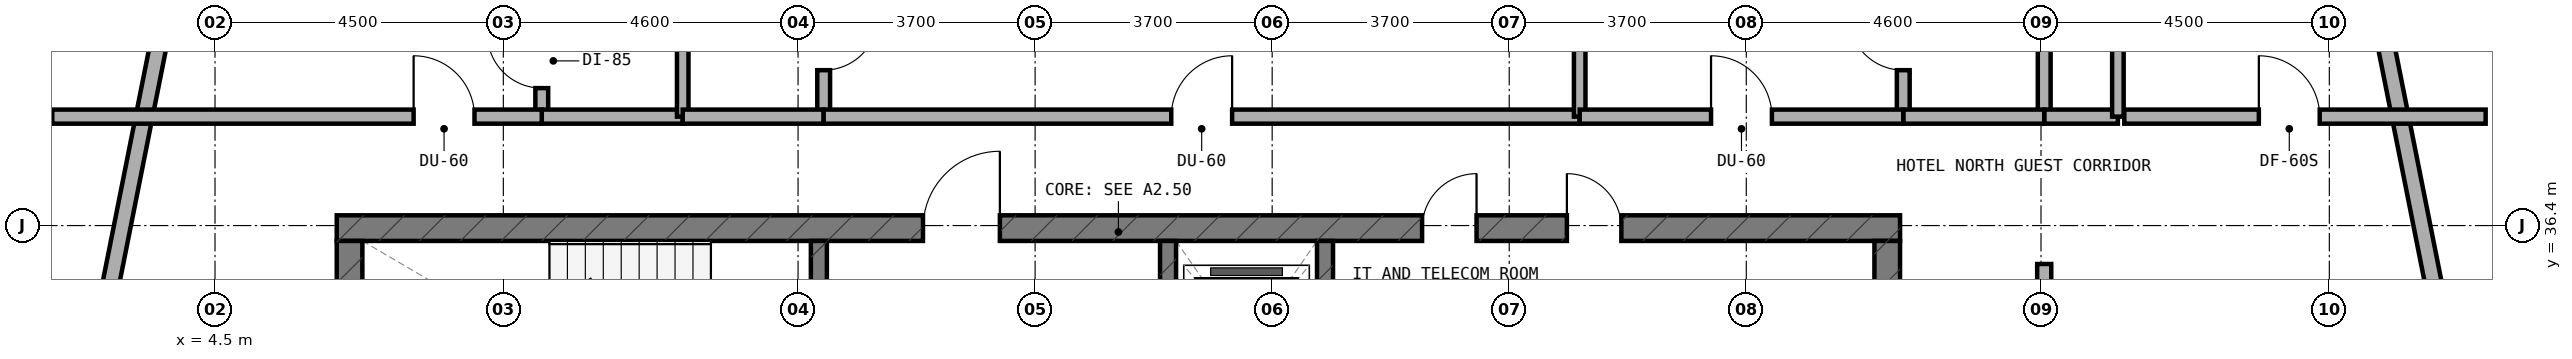
"""IFC4 building model, lengths in metres.
Left out: names, types, materials, properties, quantities, classifications, styles, units other than length and angle.
Written with IfcOpenShell. Run it as: python <this file> out.ifc"""

import sys

from ifc_helpers import new_model, si_unit, direction, frame, frame_2d, origin, place, context, subcontext, project, spatial, rectangle, extrude, element, fill, save


model = new_model("IFC4")
c1 = context("Model", 3, precision=1e-05, world=origin(), true_north=direction((0.0, 1.0)))
c2 = subcontext(c1, "Body", "Model", "MODEL_VIEW")
j1 = project(units=[si_unit("LENGTHUNIT", "METRE"), si_unit("PLANEANGLEUNIT", "RADIAN")], contexts=[c1])
p1 = place(None, origin())
s1 = spatial("IfcSite", under=j1, at=p1, CompositionType="ELEMENT")
p2 = place(p1, origin())
s2 = spatial("IfcBuilding", under=s1, at=p2, CompositionType="ELEMENT")
p3 = place(p2, frame((0.0, 0.0, 235.1)))
s3 = spatial("IfcBuildingStorey", under=s2, at=p3, CompositionType="ELEMENT", Elevation=235.1)
p4 = place(p3, frame((6.4, 36.36, 0.0), z_axis=(0.0, 0.0, 1.0), x_axis=(1.0, 0.0, 0.0)))
e1 = element("IfcWall", 1, at=p4, inside=s3, PredefinedType="SHEAR", context=c2, shape_type="SweptSolid", body=[
    extrude(rectangle(XDim=24.4, YDim=0.4, at=frame_2d((12.2, 0.0))), origin(), (0.0, 0.0, 1.0), 3.6),
])
p5 = place(p4, frame((9.15, 0.0, 0.0)))
e2 = element("IfcOpeningElement", 2, at=p5, cuts=e1, PredefinedType="OPENING", context=c2, shape_type="SweptSolid", body=[
    extrude(rectangle(XDim=1.2, YDim=2.15, at=frame_2d((0.6, 1.075))), frame((0.0, 0.21, 0.0), z_axis=(0.0, -1.0, 0.0), x_axis=(1.0, 0.0, 0.0)), (0.0, 0.0, 1.0), 0.42),
])
p6 = place(p4, frame((19.2, 0.0, 0.0)))
e3 = element("IfcOpeningElement", 3, at=p6, cuts=e1, PredefinedType="OPENING", context=c2, shape_type="SweptSolid", body=[
    extrude(rectangle(XDim=0.85, YDim=2.1, at=frame_2d((0.425, 1.05))), frame((0.0, 0.21, 0.0), z_axis=(0.0, -1.0, 0.0), x_axis=(1.0, 0.0, 0.0)), (0.0, 0.0, 1.0), 0.42),
])
p7 = place(p4, frame((16.94, 0.0, 0.0)))
e4 = element("IfcOpeningElement", 4, at=p7, cuts=e1, PredefinedType="OPENING", context=c2, shape_type="SweptSolid", body=[
    extrude(rectangle(XDim=0.85, YDim=2.1, at=frame_2d((0.425, 1.05))), frame((0.0, 0.21, 0.0), z_axis=(0.0, -1.0, 0.0), x_axis=(1.0, 0.0, 0.0)), (0.0, 0.0, 1.0), 0.42),
])
for number, where, z_axis, x_axis in (
    (5, (6.6, 33.0, 0.0), (0.0, 0.0, 1.0), (0.0, 1.0, 0.0)),
    (6, (30.6, 33.0, 0.0), (0.0, 0.0, 1.0), (0.0, 1.0, 0.0)),
):
    element("IfcWall", number, at=place(p3, frame(where, z_axis=z_axis, x_axis=x_axis)), inside=s3, PredefinedType="SHEAR", context=c2, shape_type="SweptSolid", body=[
        extrude(rectangle(XDim=3.16, YDim=0.4, at=frame_2d((1.58, 0.0))), origin(), (0.0, 0.0, 1.0), 3.6),
    ])
p8 = place(p3, frame((13.925, 33.0, 0.0), z_axis=(0.0, 0.0, 1.0), x_axis=(0.0, 1.0, 0.0)))
e7 = element("IfcWall", 7, at=p8, inside=s3, PredefinedType="STANDARD", context=c2, shape_type="SweptSolid", body=[
    extrude(rectangle(XDim=3.16, YDim=0.25, at=frame_2d((1.58, 0.0))), origin(), (0.0, 0.0, 1.0), 3.28),
])
p9 = place(p8, frame((0.98, 0.0, 0.0)))
e8 = element("IfcOpeningElement", 8, at=p9, cuts=e7, PredefinedType="OPENING", context=c2, shape_type="SweptSolid", body=[
    extrude(rectangle(XDim=1.1, YDim=2.15, at=frame_2d((0.55, 1.075))), frame((0.0, 0.135, 0.0), z_axis=(0.0, -1.0, 0.0), x_axis=(1.0, 0.0, 0.0)), (0.0, 0.0, 1.0), 0.27),
])
p10 = place(p3, frame((19.375, 33.0, 0.0), z_axis=(0.0, 0.0, 1.0), x_axis=(0.0, 1.0, 0.0)))
e9 = element("IfcWall", 9, at=p10, inside=s3, PredefinedType="STANDARD", context=c2, shape_type="SweptSolid", body=[
    extrude(rectangle(XDim=3.16, YDim=0.25, at=frame_2d((1.58, 0.0))), origin(), (0.0, 0.0, 1.0), 3.28),
])
p11 = place(p10, frame((0.98, 0.0, 0.0)))
e10 = element("IfcOpeningElement", 10, at=p11, cuts=e9, PredefinedType="OPENING", context=c2, shape_type="SweptSolid", body=[
    extrude(rectangle(XDim=1.1, YDim=2.15, at=frame_2d((0.55, 1.075))), frame((0.0, 0.135, 0.0), z_axis=(0.0, -1.0, 0.0), x_axis=(1.0, 0.0, 0.0)), (0.0, 0.0, 1.0), 0.27),
])
p12 = place(p3, frame((21.825, 33.0, 0.0), z_axis=(0.0, 0.0, 1.0), x_axis=(0.0, 1.0, 0.0)))
e11 = element("IfcWall", 11, at=p12, inside=s3, PredefinedType="STANDARD", context=c2, shape_type="SweptSolid", body=[
    extrude(rectangle(XDim=3.16, YDim=0.25, at=frame_2d((1.58, 0.0))), origin(), (0.0, 0.0, 1.0), 3.28),
])
p13 = place(p3, frame((40.084, 30.681, 0.0), z_axis=(0.0, 0.0, 1.0), x_axis=(-0.195291715883, 0.980745199176, 0.0)))
e12 = element("IfcWall", 12, at=p13, inside=s3, PredefinedType="STANDARD", context=c2, shape_type="SweptSolid", body=[
    extrude(rectangle(XDim=8.771, YDim=0.26, at=frame_2d((4.385, 0.0))), origin(), (0.0, 0.0, 1.0), 3.28),
])
p14 = place(p13, frame((2.67, 0.0, 0.85)))
e13 = element("IfcOpeningElement", 13, at=p14, cuts=e12, PredefinedType="OPENING", context=c2, shape_type="SweptSolid", body=[
    extrude(rectangle(XDim=2.1, YDim=1.5, at=frame_2d((1.05, 0.75))), frame((0.0, 0.14, 0.0), z_axis=(0.0, -1.0, 0.0), x_axis=(1.0, 0.0, 0.0)), (0.0, 0.0, 1.0), 0.28),
])
p15 = place(p3, frame((3.629, 39.283, 0.0), z_axis=(0.0, 0.0, 1.0), x_axis=(-0.195291715883, -0.980745199176, 0.0)))
e14 = element("IfcWall", 14, at=p15, inside=s3, PredefinedType="STANDARD", context=c2, shape_type="SweptSolid", body=[
    extrude(rectangle(XDim=8.771, YDim=0.26, at=frame_2d((4.385, 0.0))), origin(), (0.0, 0.0, 1.0), 3.28),
])
p16 = place(p15, frame((4.0, 0.0, 0.85)))
e15 = element("IfcOpeningElement", 15, at=p16, cuts=e14, PredefinedType="OPENING", context=c2, shape_type="SweptSolid", body=[
    extrude(rectangle(XDim=2.1, YDim=1.5, at=frame_2d((1.05, 0.75))), frame((0.0, 0.14, 0.0), z_axis=(0.0, -1.0, 0.0), x_axis=(1.0, 0.0, 0.0)), (0.0, 0.0, 1.0), 0.28),
])
p17 = place(p3, frame((9.6, 38.2, 0.0), z_axis=(0.0, 0.0, 1.0), x_axis=(0.0, 1.0, 0.0)))
e16 = element("IfcWall", 16, at=p17, inside=s3, PredefinedType="PLUMBINGWALL", context=c2, shape_type="SweptSolid", body=[
    extrude(rectangle(XDim=2.1, YDim=0.2, at=frame_2d((1.05, 0.0))), origin(), (0.0, 0.0, 1.0), 2.895),
])
p18 = place(p17, frame((0.345, 0.0, 0.0)))
e17 = element("IfcOpeningElement", 17, at=p18, cuts=e16, PredefinedType="OPENING", context=c2, shape_type="SweptSolid", body=[
    extrude(rectangle(XDim=0.85, YDim=2.1, at=frame_2d((0.425, 1.05))), frame((0.0, 0.11, 0.0), z_axis=(0.0, -1.0, 0.0), x_axis=(1.0, 0.0, 0.0)), (0.0, 0.0, 1.0), 0.22),
])
p19 = place(p3, frame((9.6, 38.1, 0.0), z_axis=(0.0, 0.0, 1.0), x_axis=(1.0, 0.0, 0.0)))
e18 = element("IfcWall", 18, at=p19, inside=s3, PredefinedType="SOLIDWALL", context=c2, shape_type="SweptSolid", body=[
    extrude(rectangle(XDim=2.2, YDim=0.22, at=frame_2d((1.1, 0.0))), origin(), (0.0, 0.0, 1.0), 3.28),
])
p20 = place(p3, frame((1.96, 38.1, 0.0), z_axis=(0.0, 0.0, 1.0), x_axis=(1.0, 0.0, 0.0)))
e19 = element("IfcWall", 19, at=p20, inside=s3, PredefinedType="SOLIDWALL", context=c2, shape_type="SweptSolid", body=[
    extrude(rectangle(XDim=7.64, YDim=0.22, at=frame_2d((3.82, 0.0))), origin(), (0.0, 0.0, 1.0), 2.705),
])
p21 = place(p20, frame((5.64, 0.0, 0.0)))
e20 = element("IfcOpeningElement", 20, at=p21, cuts=e19, PredefinedType="OPENING", context=c2, shape_type="SweptSolid", body=[
    extrude(rectangle(XDim=0.95, YDim=2.1, at=frame_2d((0.475, 1.05))), frame((0.0, 0.12, 0.0), z_axis=(0.0, -1.0, 0.0), x_axis=(1.0, 0.0, 0.0)), (0.0, 0.0, 1.0), 0.24),
])
p22 = place(p3, frame((11.8, 38.1, 0.0), z_axis=(0.0, 0.0, 1.0), x_axis=(0.0, 1.0, 0.0)))
e21 = element("IfcWall", 21, at=p22, inside=s3, PredefinedType="SOLIDWALL", context=c2, shape_type="SweptSolid", body=[
    extrude(rectangle(XDim=5.354, YDim=0.18, at=frame_2d((2.677, 0.0))), origin(), (0.0, 0.0, 1.0), 2.895),
])
p23 = place(p3, frame((14.0, 38.2, 0.0), z_axis=(0.0, 0.0, 1.0), x_axis=(0.0, 1.0, 0.0)))
e22 = element("IfcWall", 22, at=p23, inside=s3, PredefinedType="PLUMBINGWALL", context=c2, shape_type="SweptSolid", body=[
    extrude(rectangle(XDim=2.1, YDim=0.2, at=frame_2d((1.05, 0.0))), origin(), (0.0, 0.0, 1.0), 2.895),
])
p24 = place(p23, frame((0.625, 0.0, 0.0)))
e23 = element("IfcOpeningElement", 23, at=p24, cuts=e22, PredefinedType="OPENING", context=c2, shape_type="SweptSolid", body=[
    extrude(rectangle(XDim=0.85, YDim=2.1, at=frame_2d((0.425, 1.05))), frame((0.0, 0.11, 0.0), z_axis=(0.0, -1.0, 0.0), x_axis=(1.0, 0.0, 0.0)), (0.0, 0.0, 1.0), 0.22),
])
p25 = place(p3, frame((11.8, 38.1, 0.0), z_axis=(0.0, 0.0, 1.0), x_axis=(1.0, 0.0, 0.0)))
e24 = element("IfcWall", 24, at=p25, inside=s3, PredefinedType="SOLIDWALL", context=c2, shape_type="SweptSolid", body=[
    extrude(rectangle(XDim=2.2, YDim=0.22, at=frame_2d((1.1, 0.0))), origin(), (0.0, 0.0, 1.0), 3.28),
])
p26 = place(p3, frame((14.0, 38.1, 0.0), z_axis=(0.0, 0.0, 1.0), x_axis=(1.0, 0.0, 0.0)))
e25 = element("IfcWall", 25, at=p26, inside=s3, PredefinedType="SOLIDWALL", context=c2, shape_type="SweptSolid", body=[
    extrude(rectangle(XDim=11.8, YDim=0.22, at=frame_2d((5.9, 0.0))), origin(), (0.0, 0.0, 1.0), 2.705),
])
p27 = place(p26, frame((5.425, 0.0, 0.0)))
e26 = element("IfcOpeningElement", 26, at=p27, cuts=e25, PredefinedType="OPENING", context=c2, shape_type="SweptSolid", body=[
    extrude(rectangle(XDim=0.95, YDim=2.1, at=frame_2d((0.475, 1.05))), frame((0.0, 0.12, 0.0), z_axis=(0.0, -1.0, 0.0), x_axis=(1.0, 0.0, 0.0)), (0.0, 0.0, 1.0), 0.24),
])
p28 = place(p3, frame((25.8, 38.1, 0.0), z_axis=(0.0, 0.0, 1.0), x_axis=(0.0, 1.0, 0.0)))
e27 = element("IfcWall", 27, at=p28, inside=s3, PredefinedType="SOLIDWALL", context=c2, shape_type="SweptSolid", body=[
    extrude(rectangle(XDim=6.04, YDim=0.18, at=frame_2d((3.02, 0.0))), origin(), (0.0, 0.0, 1.0), 2.705),
])
p29 = place(p3, frame((30.85, 38.2, 0.0), z_axis=(0.0, 0.0, 1.0), x_axis=(0.0, 1.0, 0.0)))
e28 = element("IfcWall", 28, at=p29, inside=s3, PredefinedType="PLUMBINGWALL", context=c2, shape_type="SweptSolid", body=[
    extrude(rectangle(XDim=2.1, YDim=0.2, at=frame_2d((1.05, 0.0))), origin(), (0.0, 0.0, 1.0), 2.895),
])
p30 = place(p29, frame((0.625, 0.0, 0.0)))
e29 = element("IfcOpeningElement", 29, at=p30, cuts=e28, PredefinedType="OPENING", context=c2, shape_type="SweptSolid", body=[
    extrude(rectangle(XDim=0.85, YDim=2.1, at=frame_2d((0.425, 1.05))), frame((0.0, 0.11, 0.0), z_axis=(0.0, -1.0, 0.0), x_axis=(1.0, 0.0, 0.0)), (0.0, 0.0, 1.0), 0.22),
])
p31 = place(p3, frame((33.05, 38.2, 0.0), z_axis=(0.0, 0.0, 1.0), x_axis=(0.0, 1.0, 0.0)))
e30 = element("IfcWall", 30, at=p31, inside=s3, PredefinedType="PLUMBINGWALL", context=c2, shape_type="SweptSolid", body=[
    extrude(rectangle(XDim=2.1, YDim=0.2, at=frame_2d((1.05, 0.0))), origin(), (0.0, 0.0, 1.0), 2.895),
])
p32 = place(p3, frame((33.05, 38.1, 0.0), z_axis=(0.0, 0.0, 1.0), x_axis=(1.0, 0.0, 0.0)))
e31 = element("IfcWall", 31, at=p32, inside=s3, PredefinedType="SOLIDWALL", context=c2, shape_type="SweptSolid", body=[
    extrude(rectangle(XDim=1.15, YDim=0.22, at=frame_2d((0.575, 0.0))), origin(), (0.0, 0.0, 1.0), 2.705),
])
p33 = place(p3, frame((30.85, 38.1, 0.0), z_axis=(0.0, 0.0, 1.0), x_axis=(1.0, 0.0, 0.0)))
e32 = element("IfcWall", 32, at=p33, inside=s3, PredefinedType="SOLIDWALL", context=c2, shape_type="SweptSolid", body=[
    extrude(rectangle(XDim=2.2, YDim=0.22, at=frame_2d((1.1, 0.0))), origin(), (0.0, 0.0, 1.0), 3.28),
])
p34 = place(p3, frame((25.8, 38.1, 0.0), z_axis=(0.0, 0.0, 1.0), x_axis=(1.0, 0.0, 0.0)))
e33 = element("IfcWall", 33, at=p34, inside=s3, PredefinedType="SOLIDWALL", context=c2, shape_type="SweptSolid", body=[
    extrude(rectangle(XDim=5.05, YDim=0.22, at=frame_2d((2.525, 0.0))), origin(), (0.0, 0.0, 1.0), 2.705),
])
p35 = place(p34, frame((2.05, 0.0, 0.0)))
e34 = element("IfcOpeningElement", 34, at=p35, cuts=e33, PredefinedType="OPENING", context=c2, shape_type="SweptSolid", body=[
    extrude(rectangle(XDim=0.95, YDim=2.1, at=frame_2d((0.475, 1.05))), frame((0.0, 0.12, 0.0), z_axis=(0.0, -1.0, 0.0), x_axis=(1.0, 0.0, 0.0)), (0.0, 0.0, 1.0), 0.24),
])
p36 = place(p3, frame((34.2, 38.1, 0.0), z_axis=(0.0, 0.0, 1.0), x_axis=(0.0, 1.0, 0.0)))
e35 = element("IfcWall", 35, at=p36, inside=s3, PredefinedType="SOLIDWALL", context=c2, shape_type="SweptSolid", body=[
    extrude(rectangle(XDim=4.558, YDim=0.18, at=frame_2d((2.279, 0.0))), origin(), (0.0, 0.0, 1.0), 2.705),
])
p37 = place(p3, frame((34.3, 38.1, 0.0), z_axis=(0.0, 0.0, 1.0), x_axis=(1.0, 0.0, 0.0)))
e36 = element("IfcWall", 36, at=p37, inside=s3, PredefinedType="SOLIDWALL", context=c2, shape_type="SweptSolid", body=[
    extrude(rectangle(XDim=5.64, YDim=0.22, at=frame_2d((2.82, 0.0))), origin(), (0.0, 0.0, 1.0), 2.975),
])
p38 = place(p37, frame((2.1, 0.0, 0.0)))
e37 = element("IfcOpeningElement", 37, at=p38, cuts=e36, PredefinedType="OPENING", context=c2, shape_type="SweptSolid", body=[
    extrude(rectangle(XDim=0.95, YDim=2.1, at=frame_2d((0.475, 1.05))), frame((0.0, 0.12, 0.0), z_axis=(0.0, -1.0, 0.0), x_axis=(1.0, 0.0, 0.0)), (0.0, 0.0, 1.0), 0.24),
])
p39 = place(p3, frame((33.05, 27.2, 0.0), z_axis=(0.0, 0.0, 1.0), x_axis=(0.0, 1.0, 0.0)))
e38 = element("IfcWall", 38, at=p39, inside=s3, PredefinedType="SOLIDWALL", context=c2, shape_type="SweptSolid", body=[
    extrude(rectangle(XDim=8.6, YDim=0.22, at=frame_2d((4.3, 0.0))), origin(), (0.0, 0.0, 1.0), 2.705),
])
p40 = place(p39, frame((3.825, 0.0, 0.0)))
e39 = element("IfcOpeningElement", 39, at=p40, cuts=e38, PredefinedType="OPENING", context=c2, shape_type="SweptSolid", body=[
    extrude(rectangle(XDim=0.95, YDim=2.1, at=frame_2d((0.475, 1.05))), frame((0.0, 0.12, 0.0), z_axis=(0.0, -1.0, 0.0), x_axis=(1.0, 0.0, 0.0)), (0.0, 0.0, 1.0), 0.24),
])
p41 = place(p5, origin())
e40 = element("IfcDoor", 40, at=p41, inside=s3, OperationType="SINGLE_SWING_RIGHT", PredefinedType="DOOR", context=c2, shape_type="SweptSolid", body=[
    extrude(rectangle(XDim=1.2, YDim=2.15, at=frame_2d((0.6, 1.075))), frame((0.0, 0.025, 0.0), z_axis=(0.0, -1.0, 0.0), x_axis=(1.0, 0.0, 0.0)), (0.0, 0.0, 1.0), 0.05),
])
fill(e2, e40)
p42 = place(p6, origin())
e41 = element("IfcDoor", 41, at=p42, inside=s3, OperationType="SINGLE_SWING_LEFT", PredefinedType="DOOR", context=c2, shape_type="SweptSolid", body=[
    extrude(rectangle(XDim=0.85, YDim=2.1, at=frame_2d((0.425, 1.05))), frame((0.0, 0.025, 0.0), z_axis=(0.0, -1.0, 0.0), x_axis=(1.0, 0.0, 0.0)), (0.0, 0.0, 1.0), 0.05),
])
fill(e3, e41)
p43 = place(p7, origin())
e42 = element("IfcDoor", 42, at=p43, inside=s3, OperationType="SINGLE_SWING_RIGHT", PredefinedType="DOOR", context=c2, shape_type="SweptSolid", body=[
    extrude(rectangle(XDim=0.85, YDim=2.1, at=frame_2d((0.425, 1.05))), frame((0.0, 0.025, 0.0), z_axis=(0.0, -1.0, 0.0), x_axis=(1.0, 0.0, 0.0)), (0.0, 0.0, 1.0), 0.05),
])
fill(e4, e42)
p44 = place(p18, origin())
e43 = element("IfcDoor", 43, at=p44, inside=s3, OperationType="SINGLE_SWING_RIGHT", PredefinedType="DOOR", context=c2, shape_type="SweptSolid", body=[
    extrude(rectangle(XDim=0.85, YDim=2.1, at=frame_2d((0.425, 1.05))), frame((0.0, 0.025, 0.0), z_axis=(0.0, -1.0, 0.0), x_axis=(1.0, 0.0, 0.0)), (0.0, 0.0, 1.0), 0.05),
])
fill(e17, e43)
p45 = place(p21, origin())
e44 = element("IfcDoor", 44, at=p45, inside=s3, OperationType="SINGLE_SWING_LEFT", PredefinedType="DOOR", context=c2, shape_type="SweptSolid", body=[
    extrude(rectangle(XDim=0.95, YDim=2.1, at=frame_2d((0.475, 1.05))), frame((0.0, 0.025, 0.0), z_axis=(0.0, -1.0, 0.0), x_axis=(1.0, 0.0, 0.0)), (0.0, 0.0, 1.0), 0.05),
])
fill(e20, e44)
p46 = place(p24, frame((0.85, 0.0, 0.0), z_axis=(0.0, 0.0, 1.0), x_axis=(-1.0, 0.0, 0.0)))
e45 = element("IfcDoor", 45, at=p46, inside=s3, OperationType="SINGLE_SWING_LEFT", PredefinedType="DOOR", context=c2, shape_type="SweptSolid", body=[
    extrude(rectangle(XDim=0.85, YDim=2.1, at=frame_2d((0.425, 1.05))), frame((0.0, 0.025, 0.0), z_axis=(0.0, -1.0, 0.0), x_axis=(1.0, 0.0, 0.0)), (0.0, 0.0, 1.0), 0.05),
])
fill(e23, e45)
p47 = place(p27, origin())
e46 = element("IfcDoor", 46, at=p47, inside=s3, OperationType="SINGLE_SWING_RIGHT", PredefinedType="DOOR", context=c2, shape_type="SweptSolid", body=[
    extrude(rectangle(XDim=0.95, YDim=2.1, at=frame_2d((0.475, 1.05))), frame((0.0, 0.025, 0.0), z_axis=(0.0, -1.0, 0.0), x_axis=(1.0, 0.0, 0.0)), (0.0, 0.0, 1.0), 0.05),
])
fill(e26, e46)
p48 = place(p30, origin())
e47 = element("IfcDoor", 47, at=p48, inside=s3, OperationType="SINGLE_SWING_RIGHT", PredefinedType="DOOR", context=c2, shape_type="SweptSolid", body=[
    extrude(rectangle(XDim=0.85, YDim=2.1, at=frame_2d((0.425, 1.05))), frame((0.0, 0.025, 0.0), z_axis=(0.0, -1.0, 0.0), x_axis=(1.0, 0.0, 0.0)), (0.0, 0.0, 1.0), 0.05),
])
fill(e29, e47)
p49 = place(p35, origin())
e48 = element("IfcDoor", 48, at=p49, inside=s3, OperationType="SINGLE_SWING_LEFT", PredefinedType="DOOR", context=c2, shape_type="SweptSolid", body=[
    extrude(rectangle(XDim=0.95, YDim=2.1, at=frame_2d((0.475, 1.05))), frame((0.0, 0.025, 0.0), z_axis=(0.0, -1.0, 0.0), x_axis=(1.0, 0.0, 0.0)), (0.0, 0.0, 1.0), 0.05),
])
fill(e34, e48)
p50 = place(p38, origin())
e49 = element("IfcDoor", 49, at=p50, inside=s3, OperationType="SINGLE_SWING_LEFT", PredefinedType="DOOR", context=c2, shape_type="SweptSolid", body=[
    extrude(rectangle(XDim=0.95, YDim=2.1, at=frame_2d((0.475, 1.05))), frame((0.0, 0.025, 0.0), z_axis=(0.0, -1.0, 0.0), x_axis=(1.0, 0.0, 0.0)), (0.0, 0.0, 1.0), 0.05),
])
fill(e37, e49)
save(model, sys.argv[1])
